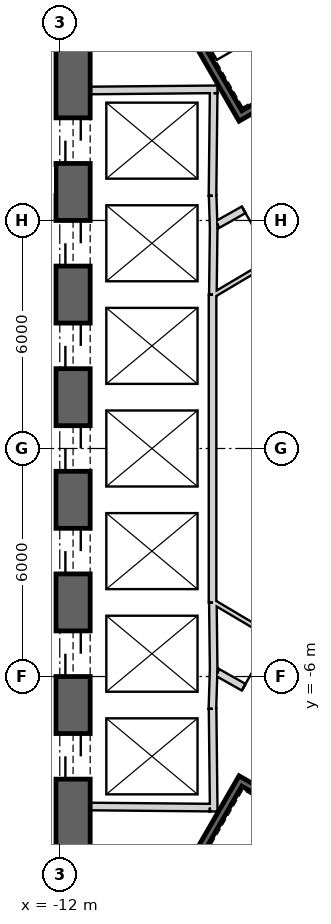
"""IFC4 building model, lengths in metres.
Left out: names, types, materials, properties, quantities, classifications, styles, units other than length and angle.
Written with IfcOpenShell. Run it as: python <this file> out.ifc"""

import sys

from ifc_helpers import new_model, si_unit, direction, frame, frame_2d, origin, place, context, subcontext, project, spatial, rectangle, extrude, element, fill, save


model = new_model("IFC4")
c1 = context("Model", 3, precision=1e-05, world=origin(), true_north=direction((0.0, 1.0)))
c2 = subcontext(c1, "Body", "Model", "MODEL_VIEW")
j1 = project(units=[si_unit("LENGTHUNIT", "METRE"), si_unit("PLANEANGLEUNIT", "RADIAN")], contexts=[c1])
p1 = place(None, origin())
s1 = spatial("IfcSite", under=j1, at=p1, CompositionType="ELEMENT")
p2 = place(p1, origin())
s2 = spatial("IfcBuilding", under=s1, at=p2, CompositionType="ELEMENT")
p3 = place(p2, frame((0.0, 0.0, 333.8)))
s3 = spatial("IfcBuildingStorey", under=s2, at=p3, CompositionType="ELEMENT", Elevation=333.8)
p4 = place(p3, frame((19.475, 2.208, 0.0), z_axis=(0.0, 0.0, 1.0), x_axis=(-0.866028369851, 0.499994862586, 0.0)))
e1 = element("IfcWall", 1, at=p4, inside=s3, PredefinedType="SHEAR", context=c2, shape_type="SweptSolid", body=[
    extrude(rectangle(XDim=31.523, YDim=0.9, at=frame_2d((15.762, 0.0))), origin(), (0.0, 0.0, 1.0), 3.9),
])
p5 = place(p4, frame((7.062, 0.0, 0.0)))
e2 = element("IfcOpeningElement", 2, at=p5, cuts=e1, PredefinedType="OPENING", context=c2, shape_type="SweptSolid", body=[
    extrude(rectangle(XDim=1.2, YDim=2.4, at=frame_2d((0.6, 1.2))), frame((0.0, 0.46, 0.0), z_axis=(0.0, -1.0, 0.0), x_axis=(1.0, 0.0, 0.0)), (0.0, 0.0, 1.0), 0.92),
])
p6 = place(p4, frame((3.612, 0.0, 0.0)))
e3 = element("IfcOpeningElement", 3, at=p6, cuts=e1, PredefinedType="OPENING", context=c2, shape_type="SweptSolid", body=[
    extrude(rectangle(XDim=1.2, YDim=2.4, at=frame_2d((0.6, 1.2))), frame((0.0, 0.46, 0.0), z_axis=(0.0, -1.0, 0.0), x_axis=(1.0, 0.0, 0.0)), (0.0, 0.0, 1.0), 0.92),
])
p7 = place(p4, frame((26.712, 0.0, 0.0)))
e4 = element("IfcOpeningElement", 4, at=p7, cuts=e1, PredefinedType="OPENING", context=c2, shape_type="SweptSolid", body=[
    extrude(rectangle(XDim=1.2, YDim=2.4, at=frame_2d((0.6, 1.2))), frame((0.0, 0.46, 0.0), z_axis=(0.0, -1.0, 0.0), x_axis=(1.0, 0.0, 0.0)), (0.0, 0.0, 1.0), 0.92),
])
p8 = place(p3, frame((-11.65, 15.762, 0.0), z_axis=(0.0, 0.0, 1.0), x_axis=(0.0, -1.0, 0.0)))
e5 = element("IfcWall", 5, at=p8, inside=s3, PredefinedType="SHEAR", context=c2, shape_type="SweptSolid", body=[
    extrude(rectangle(XDim=31.523, YDim=0.9, at=frame_2d((15.762, 0.0))), origin(), (0.0, 0.0, 1.0), 3.9),
])
p9 = place(p8, frame((7.062, 0.0, 0.0)))
e6 = element("IfcOpeningElement", 6, at=p9, cuts=e5, PredefinedType="OPENING", context=c2, shape_type="SweptSolid", body=[
    extrude(rectangle(XDim=1.2, YDim=2.4, at=frame_2d((0.6, 1.2))), frame((0.0, 0.46, 0.0), z_axis=(0.0, -1.0, 0.0), x_axis=(1.0, 0.0, 0.0)), (0.0, 0.0, 1.0), 0.92),
])
p10 = place(p8, frame((9.762, 0.0, 0.0)))
e7 = element("IfcOpeningElement", 7, at=p10, cuts=e5, PredefinedType="OPENING", context=c2, shape_type="SweptSolid", body=[
    extrude(rectangle(XDim=1.2, YDim=2.4, at=frame_2d((0.6, 1.2))), frame((0.0, 0.46, 0.0), z_axis=(0.0, -1.0, 0.0), x_axis=(1.0, 0.0, 0.0)), (0.0, 0.0, 1.0), 0.92),
])
p11 = place(p8, frame((12.462, 0.0, 0.0)))
e8 = element("IfcOpeningElement", 8, at=p11, cuts=e5, PredefinedType="OPENING", context=c2, shape_type="SweptSolid", body=[
    extrude(rectangle(XDim=1.2, YDim=2.4, at=frame_2d((0.6, 1.2))), frame((0.0, 0.46, 0.0), z_axis=(0.0, -1.0, 0.0), x_axis=(1.0, 0.0, 0.0)), (0.0, 0.0, 1.0), 0.92),
])
p12 = place(p8, frame((15.162, 0.0, 0.0)))
e9 = element("IfcOpeningElement", 9, at=p12, cuts=e5, PredefinedType="OPENING", context=c2, shape_type="SweptSolid", body=[
    extrude(rectangle(XDim=1.2, YDim=2.4, at=frame_2d((0.6, 1.2))), frame((0.0, 0.46, 0.0), z_axis=(0.0, -1.0, 0.0), x_axis=(1.0, 0.0, 0.0)), (0.0, 0.0, 1.0), 0.92),
])
p13 = place(p8, frame((17.862, 0.0, 0.0)))
e10 = element("IfcOpeningElement", 10, at=p13, cuts=e5, PredefinedType="OPENING", context=c2, shape_type="SweptSolid", body=[
    extrude(rectangle(XDim=1.2, YDim=2.4, at=frame_2d((0.6, 1.2))), frame((0.0, 0.46, 0.0), z_axis=(0.0, -1.0, 0.0), x_axis=(1.0, 0.0, 0.0)), (0.0, 0.0, 1.0), 0.92),
])
p14 = place(p8, frame((20.562, 0.0, 0.0)))
e11 = element("IfcOpeningElement", 11, at=p14, cuts=e5, PredefinedType="OPENING", context=c2, shape_type="SweptSolid", body=[
    extrude(rectangle(XDim=1.2, YDim=2.4, at=frame_2d((0.6, 1.2))), frame((0.0, 0.46, 0.0), z_axis=(0.0, -1.0, 0.0), x_axis=(1.0, 0.0, 0.0)), (0.0, 0.0, 1.0), 0.92),
])
p15 = place(p8, frame((23.262, 0.0, 0.0)))
e12 = element("IfcOpeningElement", 12, at=p15, cuts=e5, PredefinedType="OPENING", context=c2, shape_type="SweptSolid", body=[
    extrude(rectangle(XDim=1.2, YDim=2.4, at=frame_2d((0.6, 1.2))), frame((0.0, 0.46, 0.0), z_axis=(0.0, -1.0, 0.0), x_axis=(1.0, 0.0, 0.0)), (0.0, 0.0, 1.0), 0.92),
])
p16 = place(p8, frame((3.612, 0.0, 0.0)))
e13 = element("IfcOpeningElement", 13, at=p16, cuts=e5, PredefinedType="OPENING", context=c2, shape_type="SweptSolid", body=[
    extrude(rectangle(XDim=1.2, YDim=2.4, at=frame_2d((0.6, 1.2))), frame((0.0, 0.46, 0.0), z_axis=(0.0, -1.0, 0.0), x_axis=(1.0, 0.0, 0.0)), (0.0, 0.0, 1.0), 0.92),
])
p17 = place(p8, frame((26.712, 0.0, 0.0)))
e14 = element("IfcOpeningElement", 14, at=p17, cuts=e5, PredefinedType="OPENING", context=c2, shape_type="SweptSolid", body=[
    extrude(rectangle(XDim=1.2, YDim=2.4, at=frame_2d((0.6, 1.2))), frame((0.0, 0.46, 0.0), z_axis=(0.0, -1.0, 0.0), x_axis=(1.0, 0.0, 0.0)), (0.0, 0.0, 1.0), 0.92),
])
p18 = place(p3, frame((-7.825, -17.97, 0.0), z_axis=(0.0, 0.0, 1.0), x_axis=(0.866028369851, 0.499994862586, 0.0)))
e15 = element("IfcWall", 15, at=p18, inside=s3, PredefinedType="SHEAR", context=c2, shape_type="SweptSolid", body=[
    extrude(rectangle(XDim=31.523, YDim=0.9, at=frame_2d((15.762, 0.0))), origin(), (0.0, 0.0, 1.0), 3.9),
])
p19 = place(p18, frame((17.862, 0.0, 0.0)))
e16 = element("IfcOpeningElement", 16, at=p19, cuts=e15, PredefinedType="OPENING", context=c2, shape_type="SweptSolid", body=[
    extrude(rectangle(XDim=1.2, YDim=2.4, at=frame_2d((0.6, 1.2))), frame((0.0, 0.46, 0.0), z_axis=(0.0, -1.0, 0.0), x_axis=(1.0, 0.0, 0.0)), (0.0, 0.0, 1.0), 0.92),
])
p20 = place(p18, frame((20.562, 0.0, 0.0)))
e17 = element("IfcOpeningElement", 17, at=p20, cuts=e15, PredefinedType="OPENING", context=c2, shape_type="SweptSolid", body=[
    extrude(rectangle(XDim=1.2, YDim=2.4, at=frame_2d((0.6, 1.2))), frame((0.0, 0.46, 0.0), z_axis=(0.0, -1.0, 0.0), x_axis=(1.0, 0.0, 0.0)), (0.0, 0.0, 1.0), 0.92),
])
p21 = place(p18, frame((26.712, 0.0, 0.0)))
e18 = element("IfcOpeningElement", 18, at=p21, cuts=e15, PredefinedType="OPENING", context=c2, shape_type="SweptSolid", body=[
    extrude(rectangle(XDim=1.2, YDim=2.4, at=frame_2d((0.6, 1.2))), frame((0.0, 0.46, 0.0), z_axis=(0.0, -1.0, 0.0), x_axis=(1.0, 0.0, 0.0)), (0.0, 0.0, 1.0), 0.92),
])
p22 = place(p18, frame((3.612, 0.0, 0.0)))
e19 = element("IfcOpeningElement", 19, at=p22, cuts=e15, PredefinedType="OPENING", context=c2, shape_type="SweptSolid", body=[
    extrude(rectangle(XDim=1.2, YDim=2.4, at=frame_2d((0.6, 1.2))), frame((0.0, 0.46, 0.0), z_axis=(0.0, -1.0, 0.0), x_axis=(1.0, 0.0, 0.0)), (0.0, 0.0, 1.0), 0.92),
])
p23 = place(p3, frame((-11.2, 9.42, 0.0), z_axis=(0.0, 0.0, 1.0), x_axis=(0.999957167047, 0.009255488683, 0.0)))
e20 = element("IfcWall", 20, at=p23, inside=s3, PredefinedType="PLUMBINGWALL", context=c2, shape_type="SweptSolid", body=[
    extrude(rectangle(XDim=3.35, YDim=0.2, at=frame_2d((1.675, 0.0))), origin(), (0.0, 0.0, 1.0), 3.6),
])
p24 = place(p3, frame((-7.951, 9.35, 0.0), z_axis=(0.0, 0.0, 1.0), x_axis=(-0.011120469654, -0.999938165666, 0.0)))
e21 = element("IfcWall", 21, at=p24, inside=s3, PredefinedType="PLUMBINGWALL", context=c2, shape_type="SweptSolid", body=[
    extrude(rectangle(XDim=2.7, YDim=0.2, at=frame_2d((1.35, 0.0))), origin(), (0.0, 0.0, 1.0), 3.6),
])
p25 = place(p3, frame((-7.977, 6.65, 0.0), z_axis=(0.0, 0.0, 1.0), x_axis=(0.030861509705, -0.999523670164, 0.0)))
e22 = element("IfcWall", 22, at=p25, inside=s3, PredefinedType="PLUMBINGWALL", context=c2, shape_type="SweptSolid", body=[
    extrude(rectangle(XDim=0.878, YDim=0.2, at=frame_2d((0.439, 0.0))), origin(), (0.0, 0.0, 1.0), 3.6),
])
p26 = place(p3, frame((-7.949, 5.895, 0.0), z_axis=(0.0, 0.0, 1.0), x_axis=(-0.012042535896, -0.999927486035, 0.0)))
e23 = element("IfcWall", 23, at=p26, inside=s3, PredefinedType="PLUMBINGWALL", context=c2, shape_type="SweptSolid", body=[
    extrude(rectangle(XDim=1.845, YDim=0.2, at=frame_2d((0.922, 0.0))), origin(), (0.0, 0.0, 1.0), 3.6),
])
p27 = place(p3, frame((-7.98, 4.05, 0.0), z_axis=(0.0, 0.0, 1.0), x_axis=(0.0, -1.0, 0.0)))
e24 = element("IfcWall", 24, at=p27, inside=s3, PredefinedType="PLUMBINGWALL", context=c2, shape_type="SweptSolid", body=[
    extrude(rectangle(XDim=8.1, YDim=0.2, at=frame_2d((4.05, 0.0))), origin(), (0.0, 0.0, 1.0), 3.6),
])
p28 = place(p3, frame((-7.95, -5.772, 0.0), z_axis=(0.0, 0.0, 1.0), x_axis=(-0.030803413295, -0.999525462272, 0.0)))
e25 = element("IfcWall", 25, at=p28, inside=s3, PredefinedType="PLUMBINGWALL", context=c2, shape_type="SweptSolid", body=[
    extrude(rectangle(XDim=1.078, YDim=0.2, at=frame_2d((0.539, 0.0))), origin(), (0.0, 0.0, 1.0), 3.6),
])
p29 = place(p3, frame((-7.971, -4.05, 0.0), z_axis=(0.0, 0.0, 1.0), x_axis=(0.012042535896, -0.999927486035, 0.0)))
e26 = element("IfcWall", 26, at=p29, inside=s3, PredefinedType="PLUMBINGWALL", context=c2, shape_type="SweptSolid", body=[
    extrude(rectangle(XDim=1.845, YDim=0.2, at=frame_2d((0.922, 0.0))), origin(), (0.0, 0.0, 1.0), 3.6),
])
p30 = place(p3, frame((-7.979, -6.85, 0.0), z_axis=(0.0, 0.0, 1.0), x_axis=(0.011121475088, -0.999938154483, 0.0)))
e27 = element("IfcWall", 27, at=p30, inside=s3, PredefinedType="PLUMBINGWALL", context=c2, shape_type="SweptSolid", body=[
    extrude(rectangle(XDim=2.7, YDim=0.2, at=frame_2d((1.35, 0.0))), origin(), (0.0, 0.0, 1.0), 3.6),
])
p31 = place(p3, frame((-8.05, -9.449, 0.0), z_axis=(0.0, 0.0, 1.0), x_axis=(-0.999957467379, 0.009222983926, 0.0)))
e28 = element("IfcWall", 28, at=p31, inside=s3, PredefinedType="PLUMBINGWALL", context=c2, shape_type="SweptSolid", body=[
    extrude(rectangle(XDim=3.15, YDim=0.2, at=frame_2d((1.575, 0.0))), origin(), (0.0, 0.0, 1.0), 3.6),
])
p32 = place(p3, frame((-11.245, 15.678, -0.3), z_axis=(0.0, 0.0, 1.0), x_axis=(0.499977274689, -0.866038523851, 0.0)))
e29 = element("IfcWall", 29, at=p32, inside=s3, PredefinedType="SHEAR", context=c2, shape_type="SweptSolid", body=[
    extrude(rectangle(XDim=8.1, YDim=0.2, at=frame_2d((4.05, 0.0))), origin(), (0.0, 0.0, 1.0), 3.9),
])
p33 = place(p3, frame((-7.159, 8.8, -0.3), z_axis=(0.0, 0.0, 1.0), x_axis=(0.866047807691, 0.499961193289, 0.0)))
e30 = element("IfcWall", 30, at=p33, inside=s3, PredefinedType="SHEAR", context=c2, shape_type="SweptSolid", body=[
    extrude(rectangle(XDim=3.6, YDim=0.2, at=frame_2d((1.8, 0.0))), origin(), (0.0, 0.0, 1.0), 3.9),
])
p34 = place(p33, frame((1.25, 0.0, 0.3)))
e31 = element("IfcOpeningElement", 31, at=p34, cuts=e30, PredefinedType="OPENING", context=c2, shape_type="SweptSolid", body=[
    extrude(rectangle(XDim=1.1, YDim=2.1, at=frame_2d((0.55, 1.05))), frame((0.0, 0.11, 0.0), z_axis=(0.0, -1.0, 0.0), x_axis=(1.0, 0.0, 0.0)), (0.0, 0.0, 1.0), 0.22),
])
p35 = place(p3, frame((-7.196, -8.663, -0.3), z_axis=(0.0, 0.0, 1.0), x_axis=(-0.499997992926, -0.866026562566, 0.0)))
e32 = element("IfcWall", 32, at=p35, inside=s3, PredefinedType="SHEAR", context=c2, shape_type="SweptSolid", body=[
    extrude(rectangle(XDim=7.9, YDim=0.2, at=frame_2d((3.95, 0.0))), origin(), (0.0, 0.0, 1.0), 3.9),
])
p36 = place(p3, frame((-4.041, -10.599, -0.3), z_axis=(0.0, 0.0, 1.0), x_axis=(-0.866047807691, 0.499961193289, 0.0)))
e33 = element("IfcWall", 33, at=p36, inside=s3, PredefinedType="SHEAR", context=c2, shape_type="SweptSolid", body=[
    extrude(rectangle(XDim=3.6, YDim=0.2, at=frame_2d((1.8, 0.0))), origin(), (0.0, 0.0, 1.0), 3.9),
])
p37 = place(p36, frame((1.25, 0.0, 0.3)))
e34 = element("IfcOpeningElement", 34, at=p37, cuts=e33, PredefinedType="OPENING", context=c2, shape_type="SweptSolid", body=[
    extrude(rectangle(XDim=1.1, YDim=2.1, at=frame_2d((0.55, 1.05))), frame((0.0, 0.11, 0.0), z_axis=(0.0, -1.0, 0.0), x_axis=(1.0, 0.0, 0.0)), (0.0, 0.0, 1.0), 0.22),
])
p38 = place(p3, frame((-5.6, 7.16, 0.0), z_axis=(0.0, 0.0, 1.0), x_axis=(-0.871363259478, -0.490638431059, 0.0)))
e35 = element("IfcWall", 35, at=p38, inside=s3, PredefinedType="PARTITIONING", context=c2, shape_type="SweptSolid", body=[
    extrude(rectangle(XDim=2.581, YDim=0.2, at=frame_2d((1.291, 0.0))), origin(), (0.0, 0.0, 1.0), 3.6),
])
p39 = place(p38, frame((0.791, 0.0, 0.0)))
e36 = element("IfcOpeningElement", 36, at=p39, cuts=e35, PredefinedType="OPENING", context=c2, shape_type="SweptSolid", body=[
    extrude(rectangle(XDim=1.0, YDim=2.1, at=frame_2d((0.5, 1.05))), frame((0.0, 0.11, 0.0), z_axis=(0.0, -1.0, 0.0), x_axis=(1.0, 0.0, 0.0)), (0.0, 0.0, 1.0), 0.22),
])
p40 = place(p3, frame((-7.849, -5.894, 0.0), z_axis=(0.0, 0.0, 1.0), x_axis=(0.871363259478, -0.490638431059, 0.0)))
e37 = element("IfcWall", 37, at=p40, inside=s3, PredefinedType="PARTITIONING", context=c2, shape_type="SweptSolid", body=[
    extrude(rectangle(XDim=2.581, YDim=0.2, at=frame_2d((1.291, 0.0))), origin(), (0.0, 0.0, 1.0), 3.6),
])
p41 = place(p40, frame((0.791, 0.0, 0.0)))
e38 = element("IfcOpeningElement", 38, at=p41, cuts=e37, PredefinedType="OPENING", context=c2, shape_type="SweptSolid", body=[
    extrude(rectangle(XDim=1.0, YDim=2.1, at=frame_2d((0.5, 1.05))), frame((0.0, 0.11, 0.0), z_axis=(0.0, -1.0, 0.0), x_axis=(1.0, 0.0, 0.0)), (0.0, 0.0, 1.0), 0.22),
])
p42 = place(p3, frame((-7.95, -4.041, 0.0), z_axis=(0.0, 0.0, 1.0), x_axis=(0.860112457103, -0.510104461004, 0.0)))
e39 = element("IfcWall", 39, at=p42, inside=s3, PredefinedType="PARTITIONING", context=c2, shape_type="SweptSolid", body=[
    extrude(rectangle(XDim=2.104, YDim=0.12, at=frame_2d((1.052, 0.0))), origin(), (0.0, 0.0, 1.0), 3.6),
])
p43 = place(p3, frame((-6.037, 5.176, 0.0), z_axis=(0.0, 0.0, 1.0), x_axis=(-0.860106072674, -0.510115225953, 0.0)))
e40 = element("IfcWall", 40, at=p43, inside=s3, PredefinedType="PARTITIONING", context=c2, shape_type="SweptSolid", body=[
    extrude(rectangle(XDim=2.225, YDim=0.12, at=frame_2d((1.112, 0.0))), origin(), (0.0, 0.0, 1.0), 3.6),
])
p44 = place(p39, origin())
e41 = element("IfcDoor", 41, at=p44, inside=s3, OperationType="SINGLE_SWING_RIGHT", PredefinedType="USERDEFINED", context=c2, shape_type="SweptSolid", body=[
    extrude(rectangle(XDim=1.0, YDim=2.1, at=frame_2d((0.5, 1.05))), frame((0.0, 0.025, 0.0), z_axis=(0.0, -1.0, 0.0), x_axis=(1.0, 0.0, 0.0)), (0.0, 0.0, 1.0), 0.05),
])
fill(e36, e41)
p45 = place(p41, origin())
e42 = element("IfcDoor", 42, at=p45, inside=s3, OperationType="SINGLE_SWING_RIGHT", PredefinedType="USERDEFINED", context=c2, shape_type="SweptSolid", body=[
    extrude(rectangle(XDim=1.0, YDim=2.1, at=frame_2d((0.5, 1.05))), frame((0.0, 0.025, 0.0), z_axis=(0.0, -1.0, 0.0), x_axis=(1.0, 0.0, 0.0)), (0.0, 0.0, 1.0), 0.05),
])
fill(e38, e42)
p46 = place(p9, origin())
e43 = element("IfcDoor", 43, at=p46, inside=s3, OperationType="SLIDING_TO_LEFT", PredefinedType="USERDEFINED", context=c2, shape_type="SweptSolid", body=[
    extrude(rectangle(XDim=1.2, YDim=2.4, at=frame_2d((0.6, 1.2))), frame((0.0, 0.025, 0.0), z_axis=(0.0, -1.0, 0.0), x_axis=(1.0, 0.0, 0.0)), (0.0, 0.0, 1.0), 0.05),
])
fill(e6, e43)
p47 = place(p10, origin())
e44 = element("IfcDoor", 44, at=p47, inside=s3, OperationType="SLIDING_TO_LEFT", PredefinedType="USERDEFINED", context=c2, shape_type="SweptSolid", body=[
    extrude(rectangle(XDim=1.2, YDim=2.4, at=frame_2d((0.6, 1.2))), frame((0.0, 0.025, 0.0), z_axis=(0.0, -1.0, 0.0), x_axis=(1.0, 0.0, 0.0)), (0.0, 0.0, 1.0), 0.05),
])
fill(e7, e44)
p48 = place(p11, origin())
e45 = element("IfcDoor", 45, at=p48, inside=s3, OperationType="SLIDING_TO_LEFT", PredefinedType="USERDEFINED", context=c2, shape_type="SweptSolid", body=[
    extrude(rectangle(XDim=1.2, YDim=2.4, at=frame_2d((0.6, 1.2))), frame((0.0, 0.025, 0.0), z_axis=(0.0, -1.0, 0.0), x_axis=(1.0, 0.0, 0.0)), (0.0, 0.0, 1.0), 0.05),
])
fill(e8, e45)
p49 = place(p12, origin())
e46 = element("IfcDoor", 46, at=p49, inside=s3, OperationType="SLIDING_TO_LEFT", PredefinedType="USERDEFINED", context=c2, shape_type="SweptSolid", body=[
    extrude(rectangle(XDim=1.2, YDim=2.4, at=frame_2d((0.6, 1.2))), frame((0.0, 0.025, 0.0), z_axis=(0.0, -1.0, 0.0), x_axis=(1.0, 0.0, 0.0)), (0.0, 0.0, 1.0), 0.05),
])
fill(e9, e46)
p50 = place(p13, origin())
e47 = element("IfcDoor", 47, at=p50, inside=s3, OperationType="SLIDING_TO_LEFT", PredefinedType="USERDEFINED", context=c2, shape_type="SweptSolid", body=[
    extrude(rectangle(XDim=1.2, YDim=2.4, at=frame_2d((0.6, 1.2))), frame((0.0, 0.025, 0.0), z_axis=(0.0, -1.0, 0.0), x_axis=(1.0, 0.0, 0.0)), (0.0, 0.0, 1.0), 0.05),
])
fill(e10, e47)
p51 = place(p14, origin())
e48 = element("IfcDoor", 48, at=p51, inside=s3, OperationType="SLIDING_TO_LEFT", PredefinedType="USERDEFINED", context=c2, shape_type="SweptSolid", body=[
    extrude(rectangle(XDim=1.2, YDim=2.4, at=frame_2d((0.6, 1.2))), frame((0.0, 0.025, 0.0), z_axis=(0.0, -1.0, 0.0), x_axis=(1.0, 0.0, 0.0)), (0.0, 0.0, 1.0), 0.05),
])
fill(e11, e48)
p52 = place(p15, origin())
e49 = element("IfcDoor", 49, at=p52, inside=s3, OperationType="SLIDING_TO_LEFT", PredefinedType="USERDEFINED", context=c2, shape_type="SweptSolid", body=[
    extrude(rectangle(XDim=1.2, YDim=2.4, at=frame_2d((0.6, 1.2))), frame((0.0, 0.025, 0.0), z_axis=(0.0, -1.0, 0.0), x_axis=(1.0, 0.0, 0.0)), (0.0, 0.0, 1.0), 0.05),
])
fill(e12, e49)
save(model, sys.argv[1])
